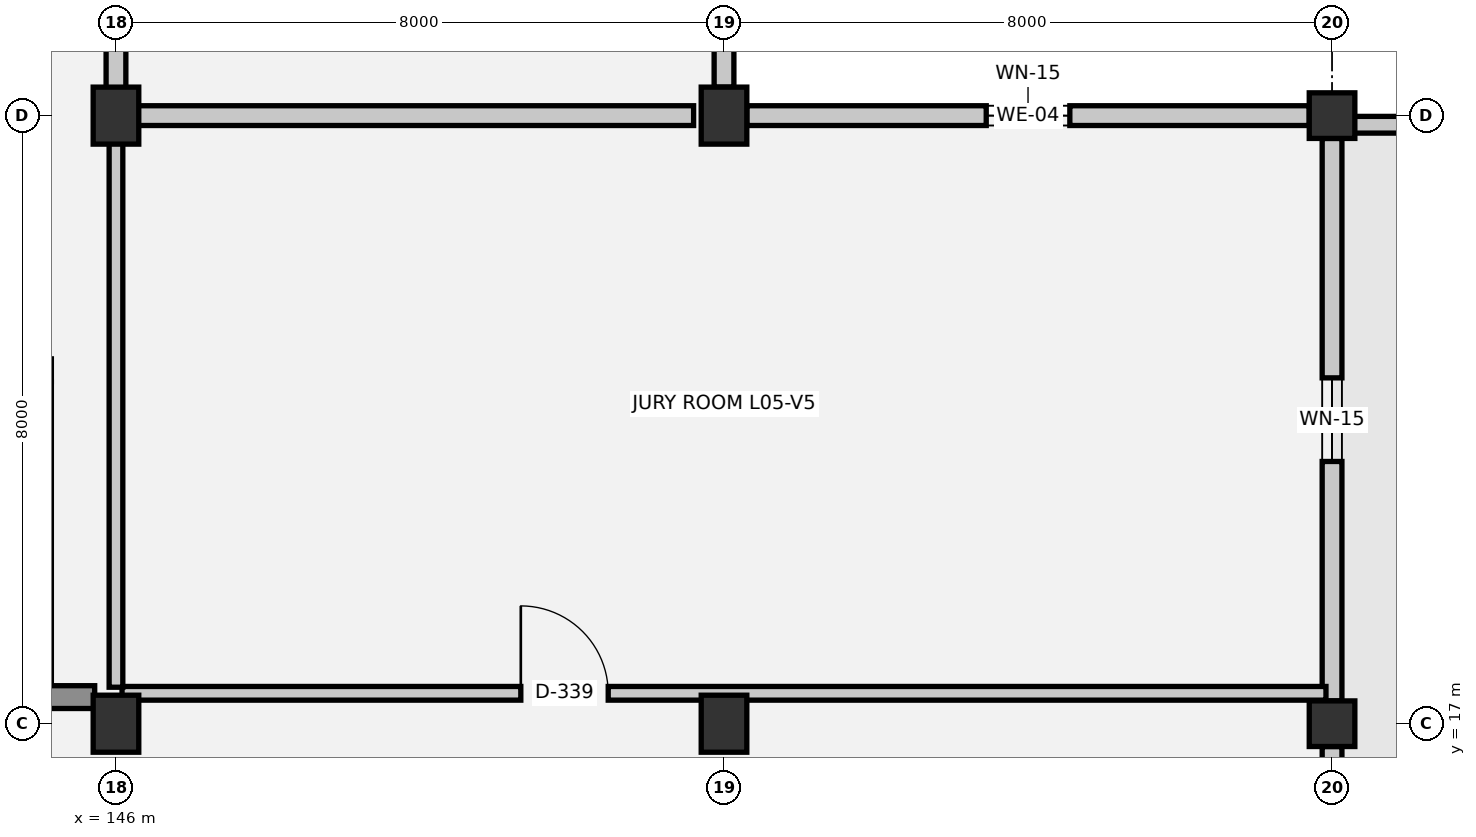
"""IFC4 building model, lengths in metres.
Left out: names, types, materials, properties, quantities, classifications, styles, units other than length and angle.
Written with IfcOpenShell. Run it as: python <this file> out.ifc"""

import sys

from ifc_helpers import new_model, si_unit, direction, frame, frame_2d, origin, origin_2d, place, context, subcontext, project, spatial, rectangle, extrude, element, fill, save


model = new_model("IFC4")
c1 = context("Model", 3, precision=1e-05, world=origin(), true_north=direction((0.0, 1.0)))
c2 = subcontext(c1, "Body", "Model", "MODEL_VIEW")
j1 = project(units=[si_unit("LENGTHUNIT", "METRE"), si_unit("PLANEANGLEUNIT", "RADIAN")], contexts=[c1])
p1 = place(None, origin())
s1 = spatial("IfcSite", under=j1, at=p1, CompositionType="ELEMENT")
p2 = place(p1, origin())
s2 = spatial("IfcBuilding", under=s1, at=p2, CompositionType="ELEMENT")
p3 = place(p2, frame((0.0, 0.0, 18.3)))
s3 = spatial("IfcBuildingStorey", under=s2, at=p3, CompositionType="ELEMENT", Elevation=18.3)
for number, where, z_axis, x_axis in (
    (1, (146.0, 17.0, 0.0), (0.0, 0.0, 1.0), (1.0, 0.0, 0.0)),
    (2, (146.0, 25.0, 0.0), (0.0, 0.0, 1.0), (1.0, 0.0, 0.0)),
    (3, (154.0, 17.0, 0.0), (0.0, 0.0, 1.0), (1.0, 0.0, 0.0)),
    (4, (154.0, 25.0, 0.0), (0.0, 0.0, 1.0), (1.0, 0.0, 0.0)),
):
    element("IfcColumn", number, at=place(p3, frame(where, z_axis=z_axis, x_axis=x_axis)), inside=s3, PredefinedType="COLUMN", context=c2, shape_type="SweptSolid", body=[
        extrude(rectangle(XDim=0.6, YDim=0.75, at=origin_2d()), origin(), (0.0, 0.0, 1.0), 3.75),
    ])
for number, where, z_axis, x_axis in (
    (5, (162.0, 17.0, 0.0), (0.0, 0.0, 1.0), (1.0, 0.0, 0.0)),
    (6, (162.0, 25.0, 0.0), (0.0, 0.0, 1.0), (1.0, 0.0, 0.0)),
):
    element("IfcColumn", number, at=place(p3, frame(where, z_axis=z_axis, x_axis=x_axis)), inside=s3, PredefinedType="COLUMN", context=c2, shape_type="SweptSolid", body=[
        extrude(rectangle(XDim=0.6, YDim=0.6, at=origin_2d()), origin(), (0.0, 0.0, 1.0), 3.75),
    ])
p4 = place(p3, frame((154.0, 31.625, 0.0), z_axis=(0.0, 0.0, 1.0), x_axis=(0.0, -1.0, 0.0)))
e7 = element("IfcWall", 7, at=p4, inside=s3, PredefinedType="SOLIDWALL", context=c2, shape_type="SweptSolid", body=[
    extrude(rectangle(XDim=6.25, YDim=0.26, at=frame_2d((3.125, 0.0))), origin(), (0.0, 0.0, 1.0), 2.55),
])
p5 = place(p4, frame((2.575, 0.0, 1.0)))
e8 = element("IfcOpeningElement", 8, at=p5, cuts=e7, PredefinedType="OPENING", context=c2, shape_type="SweptSolid", body=[
    extrude(rectangle(XDim=1.1, YDim=1.2, at=frame_2d((0.55, 0.6))), frame((0.0, 0.14, 0.0), z_axis=(0.0, -1.0, 0.0), x_axis=(1.0, 0.0, 0.0)), (0.0, 0.0, 1.0), 0.28),
])
p6 = place(p3, frame((154.3, 25.0, 0.0), z_axis=(0.0, 0.0, 1.0), x_axis=(1.0, 0.0, 0.0)))
e9 = element("IfcWall", 9, at=p6, inside=s3, PredefinedType="SOLIDWALL", context=c2, shape_type="SweptSolid", body=[
    extrude(rectangle(XDim=7.4, YDim=0.26, at=frame_2d((3.7, 0.0))), origin(), (0.0, 0.0, 1.0), 2.55),
])
p7 = place(p6, frame((3.15, 0.0, 0.9)))
e10 = element("IfcOpeningElement", 10, at=p7, cuts=e9, PredefinedType="OPENING", context=c2, shape_type="SweptSolid", body=[
    extrude(rectangle(XDim=1.1, YDim=1.2, at=frame_2d((0.55, 0.6))), frame((0.0, 0.14, 0.0), z_axis=(0.0, -1.0, 0.0), x_axis=(1.0, 0.0, 0.0)), (0.0, 0.0, 1.0), 0.28),
])
p8 = place(p3, frame((162.0, 24.7, 0.0), z_axis=(0.0, 0.0, 1.0), x_axis=(0.0, -1.0, 0.0)))
e11 = element("IfcWall", 11, at=p8, inside=s3, PredefinedType="SOLIDWALL", context=c2, shape_type="SweptSolid", body=[
    extrude(rectangle(XDim=7.4, YDim=0.26, at=frame_2d((3.7, 0.0))), origin(), (0.0, 0.0, 1.0), 2.55),
])
p9 = place(p8, frame((3.15, 0.0, 1.0)))
e12 = element("IfcOpeningElement", 12, at=p9, cuts=e11, PredefinedType="OPENING", context=c2, shape_type="SweptSolid", body=[
    extrude(rectangle(XDim=1.1, YDim=1.2, at=frame_2d((0.55, 0.6))), frame((0.0, 0.14, 0.0), z_axis=(0.0, -1.0, 0.0), x_axis=(1.0, 0.0, 0.0)), (0.0, 0.0, 1.0), 0.28),
])
p10 = place(p3, frame((162.0, 16.7, 0.0), z_axis=(0.0, 0.0, 1.0), x_axis=(0.0, -1.0, 0.0)))
e13 = element("IfcWall", 13, at=p10, inside=s3, PredefinedType="SOLIDWALL", context=c2, shape_type="SweptSolid", body=[
    extrude(rectangle(XDim=6.4, YDim=0.26, at=frame_2d((3.2, 0.0))), origin(), (0.0, 0.0, 1.0), 2.55),
])
p11 = place(p10, frame((2.65, 0.0, 1.0)))
e14 = element("IfcOpeningElement", 14, at=p11, cuts=e13, PredefinedType="OPENING", context=c2, shape_type="SweptSolid", body=[
    extrude(rectangle(XDim=1.1, YDim=1.2, at=frame_2d((0.55, 0.6))), frame((0.0, 0.14, 0.0), z_axis=(0.0, -1.0, 0.0), x_axis=(1.0, 0.0, 0.0)), (0.0, 0.0, 1.0), 0.28),
])
p12 = place(p3, frame((162.12, 24.88, 0.0), z_axis=(0.0, 0.0, 1.0), x_axis=(1.0, 0.0, 0.0)))
e15 = element("IfcWall", 15, at=p12, inside=s3, PredefinedType="PARAPET", context=c2, shape_type="SweptSolid", body=[
    extrude(rectangle(XDim=7.65, YDim=0.22, at=frame_2d((3.825, 0.0))), origin(), (0.0, 0.0, 1.0), 1.12),
])
p13 = place(p3, frame((137.45, 17.35, 0.0), z_axis=(0.0, 0.0, 1.0), x_axis=(1.0, 0.0, 0.0)))
e16 = element("IfcWall", 16, at=p13, inside=s3, PredefinedType="SHEAR", context=c2, shape_type="SweptSolid", body=[
    extrude(rectangle(XDim=8.27, YDim=0.3, at=frame_2d((4.135, 0.0))), origin(), (0.0, 0.0, 1.0), 3.47),
])
p14 = place(p3, frame((146.08, 17.4, 0.0), z_axis=(0.0, 0.0, 1.0), x_axis=(1.0, 0.0, 0.0)))
e17 = element("IfcWall", 17, at=p14, inside=s3, PredefinedType="PARTITIONING", context=c2, shape_type="SweptSolid", body=[
    extrude(rectangle(XDim=15.84, YDim=0.18, at=frame_2d((7.92, 0.0))), origin(), (0.0, 0.0, 1.0), 3.39),
])
p15 = place(p14, frame((5.247, 0.0, 0.0)))
e18 = element("IfcOpeningElement", 18, at=p15, cuts=e17, PredefinedType="OPENING", context=c2, shape_type="SweptSolid", body=[
    extrude(rectangle(XDim=1.15, YDim=2.2, at=frame_2d((0.575, 1.1))), frame((0.0, 0.1, 0.0), z_axis=(0.0, -1.0, 0.0), x_axis=(1.0, 0.0, 0.0)), (0.0, 0.0, 1.0), 0.2),
])
p16 = place(p3, frame((146.08, 25.0, 0.0), z_axis=(0.0, 0.0, 1.0), x_axis=(1.0, 0.0, 0.0)))
e19 = element("IfcWall", 19, at=p16, inside=s3, PredefinedType="SOLIDWALL", context=c2, shape_type="SweptSolid", body=[
    extrude(rectangle(XDim=7.52, YDim=0.26, at=frame_2d((3.76, 0.0))), origin(), (0.0, 0.0, 1.0), 2.82),
])
p17 = place(p3, frame((146.0, 17.48, 0.0), z_axis=(0.0, 0.0, 1.0), x_axis=(0.0, 1.0, 0.0)))
e20 = element("IfcWall", 20, at=p17, inside=s3, PredefinedType="PARTITIONING", context=c2, shape_type="SweptSolid", body=[
    extrude(rectangle(XDim=7.44, YDim=0.18, at=frame_2d((3.72, 0.0))), origin(), (0.0, 0.0, 1.0), 2.57),
])
p18 = place(p3, frame((146.0, 25.08, 0.0), z_axis=(0.0, 0.0, 1.0), x_axis=(0.0, 1.0, 0.0)))
e21 = element("IfcWall", 21, at=p18, inside=s3, PredefinedType="SOLIDWALL", context=c2, shape_type="SweptSolid", body=[
    extrude(rectangle(XDim=18.84, YDim=0.26, at=frame_2d((9.42, 0.0))), origin(), (0.0, 0.0, 1.0), 2.97),
])
p19 = place(p18, frame((8.88, 0.0, 0.0)))
e22 = element("IfcOpeningElement", 22, at=p19, cuts=e21, PredefinedType="OPENING", context=c2, shape_type="SweptSolid", body=[
    extrude(rectangle(XDim=1.08, YDim=2.1, at=frame_2d((0.54, 1.05))), frame((0.0, 0.14, 0.0), z_axis=(0.0, -1.0, 0.0), x_axis=(1.0, 0.0, 0.0)), (0.0, 0.0, 1.0), 0.28),
])
p20 = place(p7, origin())
e23 = element("IfcWindow", 23, at=p20, inside=s3, PartitioningType="SINGLE_PANEL", PredefinedType="WINDOW", context=c2, shape_type="SweptSolid", body=[
    extrude(rectangle(XDim=1.1, YDim=1.2, at=frame_2d((0.55, 0.6))), frame((0.0, 0.03, 0.0), z_axis=(0.0, -1.0, 0.0), x_axis=(1.0, 0.0, 0.0)), (0.0, 0.0, 1.0), 0.06),
])
fill(e10, e23)
p21 = place(p9, origin())
e24 = element("IfcWindow", 24, at=p21, inside=s3, PartitioningType="SINGLE_PANEL", PredefinedType="WINDOW", context=c2, shape_type="SweptSolid", body=[
    extrude(rectangle(XDim=1.1, YDim=1.2, at=frame_2d((0.55, 0.6))), frame((0.0, 0.03, 0.0), z_axis=(0.0, -1.0, 0.0), x_axis=(1.0, 0.0, 0.0)), (0.0, 0.0, 1.0), 0.06),
])
fill(e12, e24)
p22 = place(p15, origin())
e25 = element("IfcDoor", 25, at=p22, inside=s3, OperationType="SINGLE_SWING_LEFT", PredefinedType="DOOR", context=c2, shape_type="SweptSolid", body=[
    extrude(rectangle(XDim=1.15, YDim=2.2, at=frame_2d((0.575, 1.1))), frame((0.0, 0.025, 0.0), z_axis=(0.0, -1.0, 0.0), x_axis=(1.0, 0.0, 0.0)), (0.0, 0.0, 1.0), 0.05),
])
fill(e18, e25)
save(model, sys.argv[1])
